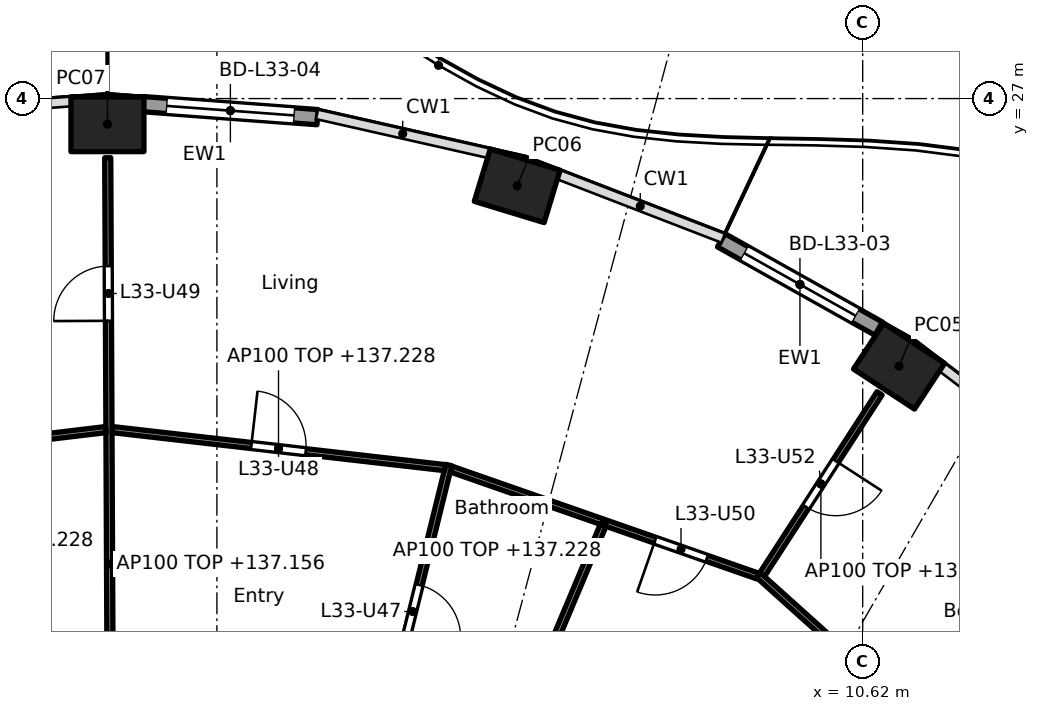
"""IFC4 building model, lengths in metres.
Left out: names, types, materials, properties, quantities, classifications, styles, units other than length and angle.
Written with IfcOpenShell. Run it as: python <this file> out.ifc"""

import sys

from ifc_helpers import new_model, si_unit, direction, frame, frame_2d, origin, origin_2d, place, context, subcontext, project, spatial, rectangle, hollow_rectangle, extrude, element, fill, save


model = new_model("IFC4")
c1 = context("Model", 3, precision=1e-05, world=origin(), true_north=direction((0.0, 1.0)))
c2 = subcontext(c1, "Body", "Model", "MODEL_VIEW")
j1 = project(units=[si_unit("LENGTHUNIT", "METRE"), si_unit("PLANEANGLEUNIT", "RADIAN")], contexts=[c1])
p1 = place(None, origin())
s1 = spatial("IfcSite", under=j1, at=p1, CompositionType="ELEMENT")
p2 = place(p1, origin())
s2 = spatial("IfcBuilding", under=s1, at=p2, CompositionType="ELEMENT")
p3 = place(p2, frame((0.0, 0.0, 134.4)))
s3 = spatial("IfcBuildingStorey", under=s2, at=p3, CompositionType="ELEMENT", Elevation=134.4)
for number, where, z_axis, x_axis in (
    (1, (11.218, 22.599, 0.0), (0.0, 0.0, 1.0), (-0.836, 0.549, 0.0)),
    (2, (4.938, 25.565, 0.0), (0.0, 0.0, 1.0), (-0.957, 0.292, 0.0)),
    (3, (-1.8, 26.577, 0.0), (0.0, 0.0, 1.0), (-1.0, 0.0, 0.0)),
):
    element("IfcColumn", number, at=place(p3, frame(where, z_axis=z_axis, x_axis=x_axis)), inside=s3, PredefinedType="COLUMN", context=c2, shape_type="SweptSolid", body=[
        extrude(hollow_rectangle(XDim=1.2, YDim=0.9, WallThickness=0.04, at=origin_2d()), origin(), (0.0, 0.0, 1.0), 3.7),
    ])
p4 = place(p3, frame((8.293, 24.67, 0.0), z_axis=(0.0, 0.0, 1.0), x_axis=(0.87206688547, -0.489386705241, 0.0)))
e4 = element("IfcWall", 4, at=p4, inside=s3, PredefinedType="SOLIDWALL", context=c2, shape_type="SweptSolid", body=[
    extrude(rectangle(XDim=2.97, YDim=0.25, at=frame_2d((1.485, 0.0))), origin(), (0.0, 0.0, 1.0), 3.44),
])
p5 = place(p4, frame((0.435, 0.0, 0.0)))
e5 = element("IfcOpeningElement", 5, at=p5, cuts=e4, PredefinedType="OPENING", context=c2, shape_type="SweptSolid", body=[
    extrude(rectangle(XDim=2.1, YDim=2.4, at=frame_2d((1.05, 1.2))), frame((0.0, 0.135, 0.0), z_axis=(0.0, -1.0, 0.0), x_axis=(1.0, 0.0, 0.0)), (0.0, 0.0, 1.0), 0.27),
])
p6 = place(p3, frame((-1.211, 26.908, 0.0), z_axis=(0.0, 0.0, 1.0), x_axis=(0.997232166829, -0.074350557769, 0.0)))
e6 = element("IfcWall", 6, at=p6, inside=s3, PredefinedType="SOLIDWALL", context=c2, shape_type="SweptSolid", body=[
    extrude(rectangle(XDim=2.873, YDim=0.25, at=frame_2d((1.437, 0.0))), origin(), (0.0, 0.0, 1.0), 3.44),
])
p7 = place(p6, frame((0.386, 0.0, 0.0)))
e7 = element("IfcOpeningElement", 7, at=p7, cuts=e6, PredefinedType="OPENING", context=c2, shape_type="SweptSolid", body=[
    extrude(rectangle(XDim=2.1, YDim=2.4, at=frame_2d((1.05, 1.2))), frame((0.0, 0.135, 0.0), z_axis=(0.0, -1.0, 0.0), x_axis=(1.0, 0.0, 0.0)), (0.0, 0.0, 1.0), 0.27),
])
p8 = place(p3, frame((13.856, 14.714, 0.0), z_axis=(0.0, 0.0, 1.0), x_axis=(-0.743793479211, 0.668409500444, 0.0)))
e8 = element("IfcWall", 8, at=p8, inside=s3, PredefinedType="PARTITIONING", context=c2, shape_type="SweptSolid", body=[
    extrude(rectangle(XDim=6.659, YDim=0.1, at=frame_2d((3.329, 0.0))), origin(), (0.0, 0.0, 1.0), 2.828),
])
p9 = place(p3, frame((8.968, 19.174, 0.0), z_axis=(0.0, 0.0, 1.0), x_axis=(0.543713319379, 0.83927100887, 0.0)))
e9 = element("IfcWall", 9, at=p9, inside=s3, PredefinedType="PARTITIONING", context=c2, shape_type="SweptSolid", body=[
    extrude(rectangle(XDim=3.549, YDim=0.1, at=frame_2d((1.774, 0.0))), origin(), (0.0, 0.0, 1.0), 2.828),
])
p10 = place(p9, frame((1.324, 0.0, 0.0)))
e10 = element("IfcOpeningElement", 10, at=p10, cuts=e9, PredefinedType="OPENING", context=c2, shape_type="SweptSolid", body=[
    extrude(rectangle(XDim=0.9, YDim=2.1, at=frame_2d((0.45, 1.05))), frame((0.0, 0.06, 0.0), z_axis=(0.0, -1.0, 0.0), x_axis=(1.0, 0.0, 0.0)), (0.0, 0.0, 1.0), 0.12),
])
p11 = place(p3, frame((8.894, 19.148, 0.0), z_axis=(0.0, 0.0, 1.0), x_axis=(-0.944182005381, 0.329424256414, 0.0)))
e11 = element("IfcWall", 11, at=p11, inside=s3, PredefinedType="PARTITIONING", context=c2, shape_type="SweptSolid", body=[
    extrude(rectangle(XDim=5.344, YDim=0.1, at=frame_2d((2.672, 0.0))), origin(), (0.0, 0.0, 1.0), 2.828),
])
p12 = place(p11, frame((0.886, 0.0, 0.0)))
e12 = element("IfcOpeningElement", 12, at=p12, cuts=e11, PredefinedType="OPENING", context=c2, shape_type="SweptSolid", body=[
    extrude(rectangle(XDim=0.9, YDim=2.1, at=frame_2d((0.45, 1.05))), frame((0.0, 0.06, 0.0), z_axis=(0.0, -1.0, 0.0), x_axis=(1.0, 0.0, 0.0)), (0.0, 0.0, 1.0), 0.12),
])
p13 = place(p3, frame((4.643, 15.918, 0.0), z_axis=(0.0, 0.0, 1.0), x_axis=(0.387539433367, 0.921853126906, 0.0)))
e13 = element("IfcWall", 13, at=p13, inside=s3, PredefinedType="PARTITIONING", context=c2, shape_type="SweptSolid", body=[
    extrude(rectangle(XDim=4.408, YDim=0.1, at=frame_2d((2.204, 0.0))), origin(), (0.0, 0.0, 1.0), 3.44),
])
p14 = place(p3, frame((1.759, 12.662, 0.0), z_axis=(0.0, 0.0, 1.0), x_axis=(0.239964949221, 0.970781552743, 0.0)))
e14 = element("IfcWall", 14, at=p14, inside=s3, PredefinedType="PARTITIONING", context=c2, shape_type="SweptSolid", body=[
    extrude(rectangle(XDim=8.562, YDim=0.1, at=frame_2d((4.281, 0.0))), origin(), (0.0, 0.0, 1.0), 2.756),
])
p15 = place(p14, frame((1.375, 0.0, 0.0)))
e15 = element("IfcOpeningElement", 15, at=p15, cuts=e14, PredefinedType="OPENING", context=c2, shape_type="SweptSolid", body=[
    extrude(rectangle(XDim=0.9, YDim=2.1, at=frame_2d((0.45, 1.05))), frame((0.0, 0.06, 0.0), z_axis=(0.0, -1.0, 0.0), x_axis=(1.0, 0.0, 0.0)), (0.0, 0.0, 1.0), 0.12),
])
p16 = place(p14, frame((5.631, 0.0, 0.0)))
e16 = element("IfcOpeningElement", 16, at=p16, cuts=e14, PredefinedType="OPENING", context=c2, shape_type="SweptSolid", body=[
    extrude(rectangle(XDim=0.9, YDim=2.1, at=frame_2d((0.45, 1.05))), frame((0.0, 0.06, 0.0), z_axis=(0.0, -1.0, 0.0), x_axis=(1.0, 0.0, 0.0)), (0.0, 0.0, 1.0), 0.12),
])
p17 = place(p3, frame((3.751, 20.93, 0.0), z_axis=(0.0, 0.0, 1.0), x_axis=(-0.993522105273, 0.113639017658, 0.0)))
e17 = element("IfcWall", 17, at=p17, inside=s3, PredefinedType="PARTITIONING", context=c2, shape_type="SweptSolid", body=[
    extrude(rectangle(XDim=5.513, YDim=0.1, at=frame_2d((2.756, 0.0))), origin(), (0.0, 0.0, 1.0), 2.828),
])
p18 = place(p17, frame((2.306, 0.0, 0.0)))
e18 = element("IfcOpeningElement", 18, at=p18, cuts=e17, PredefinedType="OPENING", context=c2, shape_type="SweptSolid", body=[
    extrude(rectangle(XDim=0.9, YDim=2.1, at=frame_2d((0.45, 1.05))), frame((0.0, 0.06, 0.0), z_axis=(0.0, -1.0, 0.0), x_axis=(1.0, 0.0, 0.0)), (0.0, 0.0, 1.0), 0.12),
])
p19 = place(p3, frame((-1.735, 12.665, 0.0), z_axis=(0.0, 0.0, 1.0), x_axis=(-0.004494500855, 0.99998989968, 0.0)))
e19 = element("IfcWall", 19, at=p19, inside=s3, PredefinedType="PARTITIONING", context=c2, shape_type="SweptSolid", body=[
    extrude(rectangle(XDim=13.363, YDim=0.1, at=frame_2d((6.681, 0.0))), origin(), (0.0, 0.0, 1.0), 2.756),
])
p20 = place(p19, frame((1.459, 0.0, 0.0)))
e20 = element("IfcOpeningElement", 20, at=p20, cuts=e19, PredefinedType="OPENING", context=c2, shape_type="SweptSolid", body=[
    extrude(rectangle(XDim=0.9, YDim=2.1, at=frame_2d((0.45, 1.05))), frame((0.0, 0.06, 0.0), z_axis=(0.0, -1.0, 0.0), x_axis=(1.0, 0.0, 0.0)), (0.0, 0.0, 1.0), 0.12),
])
p21 = place(p19, frame((10.68, 0.0, 0.0)))
e21 = element("IfcOpeningElement", 21, at=p21, cuts=e19, PredefinedType="OPENING", context=c2, shape_type="SweptSolid", body=[
    extrude(rectangle(XDim=0.9, YDim=2.1, at=frame_2d((0.45, 1.05))), frame((0.0, 0.06, 0.0), z_axis=(0.0, -1.0, 0.0), x_axis=(1.0, 0.0, 0.0)), (0.0, 0.0, 1.0), 0.12),
])
p22 = place(p3, frame((-1.825, 21.557, 0.0), z_axis=(0.0, 0.0, 1.0), x_axis=(-0.992915053711, -0.11882632753, 0.0)))
e22 = element("IfcWall", 22, at=p22, inside=s3, PredefinedType="PARTITIONING", context=c2, shape_type="SweptSolid", body=[
    extrude(rectangle(XDim=5.615, YDim=0.1, at=frame_2d((2.808, 0.0))), origin(), (0.0, 0.0, 1.0), 2.828),
])
p23 = place(p22, frame((2.358, 0.0, 0.0)))
e23 = element("IfcOpeningElement", 23, at=p23, cuts=e22, PredefinedType="OPENING", context=c2, shape_type="SweptSolid", body=[
    extrude(rectangle(XDim=0.9, YDim=2.1, at=frame_2d((0.45, 1.05))), frame((0.0, 0.06, 0.0), z_axis=(0.0, -1.0, 0.0), x_axis=(1.0, 0.0, 0.0)), (0.0, 0.0, 1.0), 0.12),
])
p24 = place(p5, origin())
e24 = element("IfcDoor", 24, at=p24, inside=s3, OperationType="SLIDING_TO_LEFT", PredefinedType="DOOR", context=c2, shape_type="SweptSolid", body=[
    extrude(rectangle(XDim=2.1, YDim=2.4, at=frame_2d((1.05, 1.2))), frame((0.0, 0.025, 0.0), z_axis=(0.0, -1.0, 0.0), x_axis=(1.0, 0.0, 0.0)), (0.0, 0.0, 1.0), 0.05),
])
fill(e5, e24)
p25 = place(p7, origin())
e25 = element("IfcDoor", 25, at=p25, inside=s3, OperationType="SLIDING_TO_LEFT", PredefinedType="DOOR", context=c2, shape_type="SweptSolid", body=[
    extrude(rectangle(XDim=2.1, YDim=2.4, at=frame_2d((1.05, 1.2))), frame((0.0, 0.025, 0.0), z_axis=(0.0, -1.0, 0.0), x_axis=(1.0, 0.0, 0.0)), (0.0, 0.0, 1.0), 0.05),
])
fill(e7, e25)
p26 = place(p16, frame((0.9, 0.0, 0.0), x_axis=(-1.0, 0.0, 0.0)))
e26 = element("IfcDoor", 26, at=p26, inside=s3, OperationType="SINGLE_SWING_RIGHT", PredefinedType="DOOR", context=c2, shape_type="SweptSolid", body=[
    extrude(rectangle(XDim=0.9, YDim=2.1, at=frame_2d((0.45, 1.05))), frame((0.0, 0.025, 0.0), z_axis=(0.0, -1.0, 0.0), x_axis=(1.0, 0.0, 0.0)), (0.0, 0.0, 1.0), 0.05),
])
fill(e16, e26)
p27 = place(p18, frame((0.9, 0.0, 0.0), x_axis=(-1.0, 0.0, 0.0)))
e27 = element("IfcDoor", 27, at=p27, inside=s3, OperationType="SINGLE_SWING_LEFT", PredefinedType="DOOR", context=c2, shape_type="SweptSolid", body=[
    extrude(rectangle(XDim=0.9, YDim=2.1, at=frame_2d((0.45, 1.05))), frame((0.0, 0.025, 0.0), z_axis=(0.0, -1.0, 0.0), x_axis=(1.0, 0.0, 0.0)), (0.0, 0.0, 1.0), 0.05),
])
fill(e18, e27)
p28 = place(p21, origin())
e28 = element("IfcDoor", 28, at=p28, inside=s3, OperationType="SINGLE_SWING_LEFT", PredefinedType="DOOR", context=c2, shape_type="SweptSolid", body=[
    extrude(rectangle(XDim=0.9, YDim=2.1, at=frame_2d((0.45, 1.05))), frame((0.0, 0.025, 0.0), z_axis=(0.0, -1.0, 0.0), x_axis=(1.0, 0.0, 0.0)), (0.0, 0.0, 1.0), 0.05),
])
fill(e21, e28)
p29 = place(p12, origin())
e29 = element("IfcDoor", 29, at=p29, inside=s3, OperationType="SINGLE_SWING_RIGHT", PredefinedType="DOOR", context=c2, shape_type="SweptSolid", body=[
    extrude(rectangle(XDim=0.9, YDim=2.1, at=frame_2d((0.45, 1.05))), frame((0.0, 0.025, 0.0), z_axis=(0.0, -1.0, 0.0), x_axis=(1.0, 0.0, 0.0)), (0.0, 0.0, 1.0), 0.05),
])
fill(e12, e29)
p30 = place(p10, frame((0.9, 0.0, 0.0), x_axis=(-1.0, 0.0, 0.0)))
e30 = element("IfcDoor", 30, at=p30, inside=s3, OperationType="SINGLE_SWING_LEFT", PredefinedType="DOOR", context=c2, shape_type="SweptSolid", body=[
    extrude(rectangle(XDim=0.9, YDim=2.1, at=frame_2d((0.45, 1.05))), frame((0.0, 0.025, 0.0), z_axis=(0.0, -1.0, 0.0), x_axis=(1.0, 0.0, 0.0)), (0.0, 0.0, 1.0), 0.05),
])
fill(e10, e30)
save(model, sys.argv[1])
